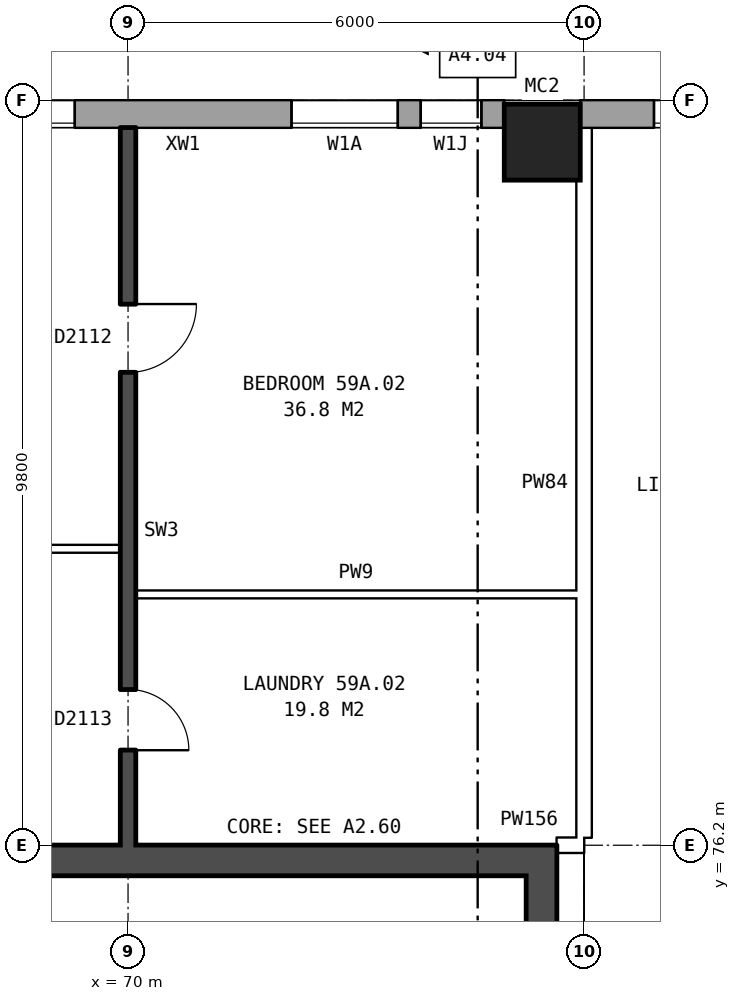
"""IFC4 building model, lengths in metres.
Left out: names, types, materials, properties, quantities, classifications, styles, units other than length and angle.
Written with IfcOpenShell. Run it as: python <this file> out.ifc"""

import sys

from ifc_helpers import new_model, si_unit, direction, frame, frame_2d, origin, origin_2d, place, context, subcontext, project, spatial, rectangle, hollow_rectangle, extrude, element, fill, save


model = new_model("IFC4")
c1 = context("Model", 3, precision=1e-05, world=origin(), true_north=direction((0.0, 1.0)))
c2 = subcontext(c1, "Body", "Model", "MODEL_VIEW")
j1 = project(units=[si_unit("LENGTHUNIT", "METRE"), si_unit("PLANEANGLEUNIT", "RADIAN")], contexts=[c1])
p1 = place(None, origin())
s1 = spatial("IfcSite", under=j1, at=p1, CompositionType="ELEMENT")
p2 = place(p1, origin())
s2 = spatial("IfcBuilding", under=s1, at=p2, CompositionType="ELEMENT")
p3 = place(p2, frame((0.0, 0.0, 209.0)))
s3 = spatial("IfcBuildingStorey", under=s2, at=p3, CompositionType="ELEMENT", Elevation=209.0)
p4 = place(p3, frame((75.45, 85.45, 0.0), z_axis=(0.0, 0.0, 1.0), x_axis=(1.0, 0.0, 0.0)))
e1 = element("IfcColumn", 1, at=p4, inside=s3, PredefinedType="COLUMN", context=c2, shape_type="SweptSolid", body=[
    extrude(hollow_rectangle(XDim=1.0, YDim=1.0, WallThickness=0.055, at=origin_2d()), origin(), (0.0, 0.0, 1.0), 3.1),
])
p5 = place(p3, frame((131.05, 85.82, 0.0), z_axis=(0.0, 0.0, 1.0), x_axis=(-1.0, 0.0, 0.0)))
e2 = element("IfcWall", 2, at=p5, inside=s3, PredefinedType="STANDARD", context=c2, shape_type="SweptSolid", body=[
    extrude(rectangle(XDim=55.1, YDim=0.36, at=frame_2d((27.55, 0.0))), origin(), (0.0, 0.0, 1.0), 2.85),
])
p6 = place(p5, frame((0.969, 0.0, 0.8)))
e3 = element("IfcOpeningElement", 3, at=p6, cuts=e2, PredefinedType="OPENING", context=c2, shape_type="SweptSolid", body=[
    extrude(rectangle(XDim=1.6, YDim=1.8, at=frame_2d((0.8, 0.9))), frame((0.0, 0.19, 0.0), z_axis=(0.0, -1.0, 0.0), x_axis=(1.0, 0.0, 0.0)), (0.0, 0.0, 1.0), 0.38),
])
p7 = place(p5, frame((4.406, 0.0, 0.8)))
e4 = element("IfcOpeningElement", 4, at=p7, cuts=e2, PredefinedType="OPENING", context=c2, shape_type="SweptSolid", body=[
    extrude(rectangle(XDim=1.6, YDim=1.8, at=frame_2d((0.8, 0.9))), frame((0.0, 0.19, 0.0), z_axis=(0.0, -1.0, 0.0), x_axis=(1.0, 0.0, 0.0)), (0.0, 0.0, 1.0), 0.38),
])
p8 = place(p5, frame((7.844, 0.0, 0.8)))
e5 = element("IfcOpeningElement", 5, at=p8, cuts=e2, PredefinedType="OPENING", context=c2, shape_type="SweptSolid", body=[
    extrude(rectangle(XDim=1.6, YDim=1.8, at=frame_2d((0.8, 0.9))), frame((0.0, 0.19, 0.0), z_axis=(0.0, -1.0, 0.0), x_axis=(1.0, 0.0, 0.0)), (0.0, 0.0, 1.0), 0.38),
])
p9 = place(p5, frame((11.281, 0.0, 0.8)))
e6 = element("IfcOpeningElement", 6, at=p9, cuts=e2, PredefinedType="OPENING", context=c2, shape_type="SweptSolid", body=[
    extrude(rectangle(XDim=1.6, YDim=1.8, at=frame_2d((0.8, 0.9))), frame((0.0, 0.19, 0.0), z_axis=(0.0, -1.0, 0.0), x_axis=(1.0, 0.0, 0.0)), (0.0, 0.0, 1.0), 0.38),
])
p10 = place(p5, frame((14.719, 0.0, 0.8)))
e7 = element("IfcOpeningElement", 7, at=p10, cuts=e2, PredefinedType="OPENING", context=c2, shape_type="SweptSolid", body=[
    extrude(rectangle(XDim=1.6, YDim=1.8, at=frame_2d((0.8, 0.9))), frame((0.0, 0.19, 0.0), z_axis=(0.0, -1.0, 0.0), x_axis=(1.0, 0.0, 0.0)), (0.0, 0.0, 1.0), 0.38),
])
p11 = place(p5, frame((18.156, 0.0, 0.8)))
e8 = element("IfcOpeningElement", 8, at=p11, cuts=e2, PredefinedType="OPENING", context=c2, shape_type="SweptSolid", body=[
    extrude(rectangle(XDim=1.6, YDim=1.8, at=frame_2d((0.8, 0.9))), frame((0.0, 0.19, 0.0), z_axis=(0.0, -1.0, 0.0), x_axis=(1.0, 0.0, 0.0)), (0.0, 0.0, 1.0), 0.38),
])
p12 = place(p5, frame((21.594, 0.0, 0.8)))
e9 = element("IfcOpeningElement", 9, at=p12, cuts=e2, PredefinedType="OPENING", context=c2, shape_type="SweptSolid", body=[
    extrude(rectangle(XDim=1.6, YDim=1.8, at=frame_2d((0.8, 0.9))), frame((0.0, 0.19, 0.0), z_axis=(0.0, -1.0, 0.0), x_axis=(1.0, 0.0, 0.0)), (0.0, 0.0, 1.0), 0.38),
])
p13 = place(p5, frame((25.031, 0.0, 0.8)))
e10 = element("IfcOpeningElement", 10, at=p13, cuts=e2, PredefinedType="OPENING", context=c2, shape_type="SweptSolid", body=[
    extrude(rectangle(XDim=1.6, YDim=1.8, at=frame_2d((0.8, 0.9))), frame((0.0, 0.19, 0.0), z_axis=(0.0, -1.0, 0.0), x_axis=(1.0, 0.0, 0.0)), (0.0, 0.0, 1.0), 0.38),
])
p14 = place(p5, frame((28.469, 0.0, 0.8)))
e11 = element("IfcOpeningElement", 11, at=p14, cuts=e2, PredefinedType="OPENING", context=c2, shape_type="SweptSolid", body=[
    extrude(rectangle(XDim=1.6, YDim=1.8, at=frame_2d((0.8, 0.9))), frame((0.0, 0.19, 0.0), z_axis=(0.0, -1.0, 0.0), x_axis=(1.0, 0.0, 0.0)), (0.0, 0.0, 1.0), 0.38),
])
p15 = place(p5, frame((31.906, 0.0, 0.8)))
e12 = element("IfcOpeningElement", 12, at=p15, cuts=e2, PredefinedType="OPENING", context=c2, shape_type="SweptSolid", body=[
    extrude(rectangle(XDim=1.6, YDim=1.8, at=frame_2d((0.8, 0.9))), frame((0.0, 0.19, 0.0), z_axis=(0.0, -1.0, 0.0), x_axis=(1.0, 0.0, 0.0)), (0.0, 0.0, 1.0), 0.38),
])
p16 = place(p5, frame((35.344, 0.0, 0.8)))
e13 = element("IfcOpeningElement", 13, at=p16, cuts=e2, PredefinedType="OPENING", context=c2, shape_type="SweptSolid", body=[
    extrude(rectangle(XDim=1.6, YDim=1.8, at=frame_2d((0.8, 0.9))), frame((0.0, 0.19, 0.0), z_axis=(0.0, -1.0, 0.0), x_axis=(1.0, 0.0, 0.0)), (0.0, 0.0, 1.0), 0.38),
])
p17 = place(p5, frame((38.781, 0.0, 0.8)))
e14 = element("IfcOpeningElement", 14, at=p17, cuts=e2, PredefinedType="OPENING", context=c2, shape_type="SweptSolid", body=[
    extrude(rectangle(XDim=1.6, YDim=1.8, at=frame_2d((0.8, 0.9))), frame((0.0, 0.19, 0.0), z_axis=(0.0, -1.0, 0.0), x_axis=(1.0, 0.0, 0.0)), (0.0, 0.0, 1.0), 0.38),
])
p18 = place(p5, frame((42.219, 0.0, 0.8)))
e15 = element("IfcOpeningElement", 15, at=p18, cuts=e2, PredefinedType="OPENING", context=c2, shape_type="SweptSolid", body=[
    extrude(rectangle(XDim=1.6, YDim=1.8, at=frame_2d((0.8, 0.9))), frame((0.0, 0.19, 0.0), z_axis=(0.0, -1.0, 0.0), x_axis=(1.0, 0.0, 0.0)), (0.0, 0.0, 1.0), 0.38),
])
p19 = place(p5, frame((45.656, 0.0, 0.8)))
e16 = element("IfcOpeningElement", 16, at=p19, cuts=e2, PredefinedType="OPENING", context=c2, shape_type="SweptSolid", body=[
    extrude(rectangle(XDim=1.6, YDim=1.8, at=frame_2d((0.8, 0.9))), frame((0.0, 0.19, 0.0), z_axis=(0.0, -1.0, 0.0), x_axis=(1.0, 0.0, 0.0)), (0.0, 0.0, 1.0), 0.38),
])
p20 = place(p5, frame((49.094, 0.0, 0.8)))
e17 = element("IfcOpeningElement", 17, at=p20, cuts=e2, PredefinedType="OPENING", context=c2, shape_type="SweptSolid", body=[
    extrude(rectangle(XDim=1.6, YDim=1.8, at=frame_2d((0.8, 0.9))), frame((0.0, 0.19, 0.0), z_axis=(0.0, -1.0, 0.0), x_axis=(1.0, 0.0, 0.0)), (0.0, 0.0, 1.0), 0.38),
])
p21 = place(p5, frame((52.531, 0.0, 0.8)))
e18 = element("IfcOpeningElement", 18, at=p21, cuts=e2, PredefinedType="OPENING", context=c2, shape_type="SweptSolid", body=[
    extrude(rectangle(XDim=1.6, YDim=1.8, at=frame_2d((0.8, 0.9))), frame((0.0, 0.19, 0.0), z_axis=(0.0, -1.0, 0.0), x_axis=(1.0, 0.0, 0.0)), (0.0, 0.0, 1.0), 0.38),
])
p22 = place(p3, frame((74.95, 85.82, 0.0), z_axis=(0.0, 0.0, 1.0), x_axis=(-1.0, 0.0, 0.0)))
e19 = element("IfcWall", 19, at=p22, inside=s3, PredefinedType="STANDARD", context=c2, shape_type="SweptSolid", body=[
    extrude(rectangle(XDim=39.875, YDim=0.36, at=frame_2d((19.938, 0.0))), origin(), (0.0, 0.0, 1.0), 2.85),
])
p23 = place(p22, frame((0.3, 0.0, 0.8)))
e20 = element("IfcOpeningElement", 20, at=p23, cuts=e19, PredefinedType="OPENING", context=c2, shape_type="SweptSolid", body=[
    extrude(rectangle(XDim=0.8, YDim=1.5, at=frame_2d((0.4, 0.75))), frame((0.0, 0.19, 0.0), z_axis=(0.0, -1.0, 0.0), x_axis=(1.0, 0.0, 0.0)), (0.0, 0.0, 1.0), 0.38),
])
p24 = place(p22, frame((5.65, 0.0, 0.8)))
e21 = element("IfcOpeningElement", 21, at=p24, cuts=e19, PredefinedType="OPENING", context=c2, shape_type="SweptSolid", body=[
    extrude(rectangle(XDim=1.6, YDim=1.8, at=frame_2d((0.8, 0.9))), frame((0.0, 0.19, 0.0), z_axis=(0.0, -1.0, 0.0), x_axis=(1.0, 0.0, 0.0)), (0.0, 0.0, 1.0), 0.38),
])
p25 = place(p22, frame((8.65, 0.0, 0.8)))
e22 = element("IfcOpeningElement", 22, at=p25, cuts=e19, PredefinedType="OPENING", context=c2, shape_type="SweptSolid", body=[
    extrude(rectangle(XDim=1.6, YDim=1.8, at=frame_2d((0.8, 0.9))), frame((0.0, 0.19, 0.0), z_axis=(0.0, -1.0, 0.0), x_axis=(1.0, 0.0, 0.0)), (0.0, 0.0, 1.0), 0.38),
])
p26 = place(p22, frame((11.65, 0.0, 0.8)))
e23 = element("IfcOpeningElement", 23, at=p26, cuts=e19, PredefinedType="OPENING", context=c2, shape_type="SweptSolid", body=[
    extrude(rectangle(XDim=1.6, YDim=1.8, at=frame_2d((0.8, 0.9))), frame((0.0, 0.19, 0.0), z_axis=(0.0, -1.0, 0.0), x_axis=(1.0, 0.0, 0.0)), (0.0, 0.0, 1.0), 0.38),
])
p27 = place(p22, frame((14.65, 0.0, 0.8)))
e24 = element("IfcOpeningElement", 24, at=p27, cuts=e19, PredefinedType="OPENING", context=c2, shape_type="SweptSolid", body=[
    extrude(rectangle(XDim=1.6, YDim=1.8, at=frame_2d((0.8, 0.9))), frame((0.0, 0.19, 0.0), z_axis=(0.0, -1.0, 0.0), x_axis=(1.0, 0.0, 0.0)), (0.0, 0.0, 1.0), 0.38),
])
p28 = place(p22, frame((17.65, 0.0, 0.8)))
e25 = element("IfcOpeningElement", 25, at=p28, cuts=e19, PredefinedType="OPENING", context=c2, shape_type="SweptSolid", body=[
    extrude(rectangle(XDim=1.6, YDim=1.8, at=frame_2d((0.8, 0.9))), frame((0.0, 0.19, 0.0), z_axis=(0.0, -1.0, 0.0), x_axis=(1.0, 0.0, 0.0)), (0.0, 0.0, 1.0), 0.38),
])
p29 = place(p22, frame((20.65, 0.0, 0.8)))
e26 = element("IfcOpeningElement", 26, at=p29, cuts=e19, PredefinedType="OPENING", context=c2, shape_type="SweptSolid", body=[
    extrude(rectangle(XDim=1.6, YDim=1.8, at=frame_2d((0.8, 0.9))), frame((0.0, 0.19, 0.0), z_axis=(0.0, -1.0, 0.0), x_axis=(1.0, 0.0, 0.0)), (0.0, 0.0, 1.0), 0.38),
])
p30 = place(p22, frame((23.65, 0.0, 0.8)))
e27 = element("IfcOpeningElement", 27, at=p30, cuts=e19, PredefinedType="OPENING", context=c2, shape_type="SweptSolid", body=[
    extrude(rectangle(XDim=1.6, YDim=1.8, at=frame_2d((0.8, 0.9))), frame((0.0, 0.19, 0.0), z_axis=(0.0, -1.0, 0.0), x_axis=(1.0, 0.0, 0.0)), (0.0, 0.0, 1.0), 0.38),
])
p31 = place(p22, frame((26.65, 0.0, 0.8)))
e28 = element("IfcOpeningElement", 28, at=p31, cuts=e19, PredefinedType="OPENING", context=c2, shape_type="SweptSolid", body=[
    extrude(rectangle(XDim=1.6, YDim=1.8, at=frame_2d((0.8, 0.9))), frame((0.0, 0.19, 0.0), z_axis=(0.0, -1.0, 0.0), x_axis=(1.0, 0.0, 0.0)), (0.0, 0.0, 1.0), 0.38),
])
p32 = place(p22, frame((29.65, 0.0, 0.8)))
e29 = element("IfcOpeningElement", 29, at=p32, cuts=e19, PredefinedType="OPENING", context=c2, shape_type="SweptSolid", body=[
    extrude(rectangle(XDim=1.6, YDim=1.8, at=frame_2d((0.8, 0.9))), frame((0.0, 0.19, 0.0), z_axis=(0.0, -1.0, 0.0), x_axis=(1.0, 0.0, 0.0)), (0.0, 0.0, 1.0), 0.38),
])
p33 = place(p22, frame((32.65, 0.0, 0.8)))
e30 = element("IfcOpeningElement", 30, at=p33, cuts=e19, PredefinedType="OPENING", context=c2, shape_type="SweptSolid", body=[
    extrude(rectangle(XDim=1.6, YDim=1.8, at=frame_2d((0.8, 0.9))), frame((0.0, 0.19, 0.0), z_axis=(0.0, -1.0, 0.0), x_axis=(1.0, 0.0, 0.0)), (0.0, 0.0, 1.0), 0.38),
])
p34 = place(p22, frame((35.15, 0.0, 0.8)))
e31 = element("IfcOpeningElement", 31, at=p34, cuts=e19, PredefinedType="OPENING", context=c2, shape_type="SweptSolid", body=[
    extrude(rectangle(XDim=1.0, YDim=1.8, at=frame_2d((0.5, 0.9))), frame((0.0, 0.19, 0.0), z_axis=(0.0, -1.0, 0.0), x_axis=(1.0, 0.0, 0.0)), (0.0, 0.0, 1.0), 0.38),
])
p35 = place(p22, frame((1.4, 0.0, 0.8)))
e32 = element("IfcOpeningElement", 32, at=p35, cuts=e19, PredefinedType="OPENING", context=c2, shape_type="SweptSolid", body=[
    extrude(rectangle(XDim=1.4, YDim=1.8, at=frame_2d((0.7, 0.9))), frame((0.0, 0.19, 0.0), z_axis=(0.0, -1.0, 0.0), x_axis=(1.0, 0.0, 0.0)), (0.0, 0.0, 1.0), 0.38),
])
p36 = place(p22, frame((38.55, 0.0, 0.8)))
e33 = element("IfcOpeningElement", 33, at=p36, cuts=e19, PredefinedType="OPENING", context=c2, shape_type="SweptSolid", body=[
    extrude(rectangle(XDim=1.0, YDim=1.8, at=frame_2d((0.5, 0.9))), frame((0.0, 0.19, 0.0), z_axis=(0.0, -1.0, 0.0), x_axis=(1.0, 0.0, 0.0)), (0.0, 0.0, 1.0), 0.38),
])
p37 = place(p3, frame((75.44, 63.8, 0.0), z_axis=(0.0, 0.0, 1.0), x_axis=(0.0, 1.0, 0.0)))
e34 = element("IfcWall", 34, at=p37, inside=s3, PredefinedType="SHEAR", context=c2, shape_type="SweptSolid", body=[
    extrude(rectangle(XDim=12.4, YDim=0.4, at=frame_2d((6.2, 0.0))), origin(), (0.0, 0.0, 1.0), 2.85),
])
p38 = place(p37, frame((9.8, 0.0, 0.0)))
e35 = element("IfcOpeningElement", 35, at=p38, cuts=e34, PredefinedType="OPENING", context=c2, shape_type="SweptSolid", body=[
    extrude(rectangle(XDim=1.1, YDim=2.1, at=frame_2d((0.55, 1.05))), frame((0.0, 0.21, 0.0), z_axis=(0.0, -1.0, 0.0), x_axis=(1.0, 0.0, 0.0)), (0.0, 0.0, 1.0), 0.42),
])
p39 = place(p3, frame((67.04, 76.0, 0.0), z_axis=(0.0, 0.0, 1.0), x_axis=(1.0, 0.0, 0.0)))
e36 = element("IfcWall", 36, at=p39, inside=s3, PredefinedType="SHEAR", context=c2, shape_type="SweptSolid", body=[
    extrude(rectangle(XDim=8.2, YDim=0.4, at=frame_2d((4.1, 0.0))), origin(), (0.0, 0.0, 1.0), 2.85),
])
p40 = place(p3, frame((75.64, 76.2, 0.0), z_axis=(0.0, 0.0, 1.0), x_axis=(1.0, 0.0, 0.0)))
e37 = element("IfcWall", 37, at=p40, inside=s3, PredefinedType="PARTITIONING", context=c2, shape_type="SweptSolid", body=[
    extrude(rectangle(XDim=0.36, YDim=0.2, at=frame_2d((0.18, 0.0))), origin(), (0.0, 0.0, 1.0), 2.85),
])
p41 = place(p3, frame((70.1, 79.5, 0.0), z_axis=(0.0, 0.0, 1.0), x_axis=(1.0, 0.0, 0.0)))
e38 = element("IfcWall", 38, at=p41, inside=s3, PredefinedType="PARTITIONING", context=c2, shape_type="SweptSolid", body=[
    extrude(rectangle(XDim=5.8, YDim=0.1, at=frame_2d((2.9, 0.0))), origin(), (0.0, 0.0, 1.0), 2.85),
])
p42 = place(p3, frame((64.1, 80.1, 0.0), z_axis=(0.0, 0.0, 1.0), x_axis=(1.0, 0.0, 0.0)))
e39 = element("IfcWall", 39, at=p42, inside=s3, PredefinedType="PARTITIONING", context=c2, shape_type="SweptSolid", body=[
    extrude(rectangle(XDim=5.8, YDim=0.1, at=frame_2d((2.9, 0.0))), origin(), (0.0, 0.0, 1.0), 2.85),
])
p43 = place(p42, frame((3.6, 0.0, 0.0)))
e40 = element("IfcOpeningElement", 40, at=p43, cuts=e39, PredefinedType="OPENING", context=c2, shape_type="SweptSolid", body=[
    extrude(rectangle(XDim=0.9, YDim=2.1, at=frame_2d((0.45, 1.05))), frame((0.0, 0.06, 0.0), z_axis=(0.0, -1.0, 0.0), x_axis=(1.0, 0.0, 0.0)), (0.0, 0.0, 1.0), 0.12),
])
p44 = place(p42, frame((0.7, 0.0, 0.0)))
e41 = element("IfcOpeningElement", 41, at=p44, cuts=e39, PredefinedType="OPENING", context=c2, shape_type="SweptSolid", body=[
    extrude(rectangle(XDim=0.9, YDim=2.1, at=frame_2d((0.45, 1.05))), frame((0.0, 0.06, 0.0), z_axis=(0.0, -1.0, 0.0), x_axis=(1.0, 0.0, 0.0)), (0.0, 0.0, 1.0), 0.12),
])
p45 = place(p3, frame((70.0, 76.2, 0.0), z_axis=(0.0, 0.0, 1.0), x_axis=(0.0, 1.0, 0.0)))
e42 = element("IfcWall", 42, at=p45, inside=s3, PredefinedType="SOLIDWALL", context=c2, shape_type="SweptSolid", body=[
    extrude(rectangle(XDim=9.44, YDim=0.2, at=frame_2d((4.72, 0.0))), origin(), (0.0, 0.0, 1.0), 2.85),
])
p46 = place(p45, frame((6.22, 0.0, 0.0)))
e43 = element("IfcOpeningElement", 43, at=p46, cuts=e42, PredefinedType="OPENING", context=c2, shape_type="SweptSolid", body=[
    extrude(rectangle(XDim=0.9, YDim=2.1, at=frame_2d((0.45, 1.05))), frame((0.0, 0.11, 0.0), z_axis=(0.0, -1.0, 0.0), x_axis=(1.0, 0.0, 0.0)), (0.0, 0.0, 1.0), 0.22),
])
p47 = place(p45, frame((1.25, 0.0, 0.0)))
e44 = element("IfcOpeningElement", 44, at=p47, cuts=e42, PredefinedType="OPENING", context=c2, shape_type="SweptSolid", body=[
    extrude(rectangle(XDim=0.8, YDim=2.1, at=frame_2d((0.4, 1.05))), frame((0.0, 0.11, 0.0), z_axis=(0.0, -1.0, 0.0), x_axis=(1.0, 0.0, 0.0)), (0.0, 0.0, 1.0), 0.22),
])
p48 = place(p3, frame((76.0, 76.3, 0.0), z_axis=(0.0, 0.0, 1.0), x_axis=(0.0, 1.0, 0.0)))
e45 = element("IfcWall", 45, at=p48, inside=s3, PredefinedType="PARTITIONING", context=c2, shape_type="SweptSolid", body=[
    extrude(rectangle(XDim=9.34, YDim=0.2, at=frame_2d((4.67, 0.0))), origin(), (0.0, 0.0, 1.0), 2.85),
])
p49 = place(p21, origin())
e46 = element("IfcWindow", 46, at=p49, inside=s3, PartitioningType="SINGLE_PANEL", PredefinedType="WINDOW", context=c2, shape_type="SweptSolid", body=[
    extrude(rectangle(XDim=1.6, YDim=1.8, at=frame_2d((0.8, 0.9))), frame((0.0, 0.15, 0.0), z_axis=(0.0, -1.0, 0.0), x_axis=(1.0, 0.0, 0.0)), (0.0, 0.0, 1.0), 0.06),
])
fill(e18, e46)
p50 = place(p23, origin())
e47 = element("IfcWindow", 47, at=p50, inside=s3, PartitioningType="SINGLE_PANEL", PredefinedType="WINDOW", context=c2, shape_type="SweptSolid", body=[
    extrude(rectangle(XDim=0.8, YDim=1.5, at=frame_2d((0.4, 0.75))), frame((0.0, 0.15, 0.0), z_axis=(0.0, -1.0, 0.0), x_axis=(1.0, 0.0, 0.0)), (0.0, 0.0, 1.0), 0.06),
])
fill(e20, e47)
p51 = place(p24, origin())
e48 = element("IfcWindow", 48, at=p51, inside=s3, PartitioningType="SINGLE_PANEL", PredefinedType="WINDOW", context=c2, shape_type="SweptSolid", body=[
    extrude(rectangle(XDim=1.6, YDim=1.8, at=frame_2d((0.8, 0.9))), frame((0.0, 0.15, 0.0), z_axis=(0.0, -1.0, 0.0), x_axis=(1.0, 0.0, 0.0)), (0.0, 0.0, 1.0), 0.06),
])
fill(e21, e48)
p52 = place(p46, frame((0.9, 0.0, 0.0), z_axis=(0.0, 0.0, 1.0), x_axis=(-1.0, 0.0, 0.0)))
e49 = element("IfcDoor", 49, at=p52, inside=s3, OperationType="SINGLE_SWING_LEFT", PredefinedType="DOOR", context=c2, shape_type="SweptSolid", body=[
    extrude(rectangle(XDim=0.9, YDim=2.1, at=frame_2d((0.45, 1.05))), frame((0.0, 0.025, 0.0), z_axis=(0.0, -1.0, 0.0), x_axis=(1.0, 0.0, 0.0)), (0.0, 0.0, 1.0), 0.05),
])
fill(e43, e49)
p53 = place(p47, frame((0.8, 0.0, 0.0), z_axis=(0.0, 0.0, 1.0), x_axis=(-1.0, 0.0, 0.0)))
e50 = element("IfcDoor", 50, at=p53, inside=s3, OperationType="SINGLE_SWING_RIGHT", PredefinedType="DOOR", context=c2, shape_type="SweptSolid", body=[
    extrude(rectangle(XDim=0.8, YDim=2.1, at=frame_2d((0.4, 1.05))), frame((0.0, 0.025, 0.0), z_axis=(0.0, -1.0, 0.0), x_axis=(1.0, 0.0, 0.0)), (0.0, 0.0, 1.0), 0.05),
])
fill(e44, e50)
p54 = place(p35, origin())
e51 = element("IfcWindow", 51, at=p54, inside=s3, PartitioningType="SINGLE_PANEL", PredefinedType="WINDOW", context=c2, shape_type="SweptSolid", body=[
    extrude(rectangle(XDim=1.4, YDim=1.8, at=frame_2d((0.7, 0.9))), frame((0.0, 0.15, 0.0), z_axis=(0.0, -1.0, 0.0), x_axis=(1.0, 0.0, 0.0)), (0.0, 0.0, 1.0), 0.06),
])
fill(e32, e51)
save(model, sys.argv[1])
